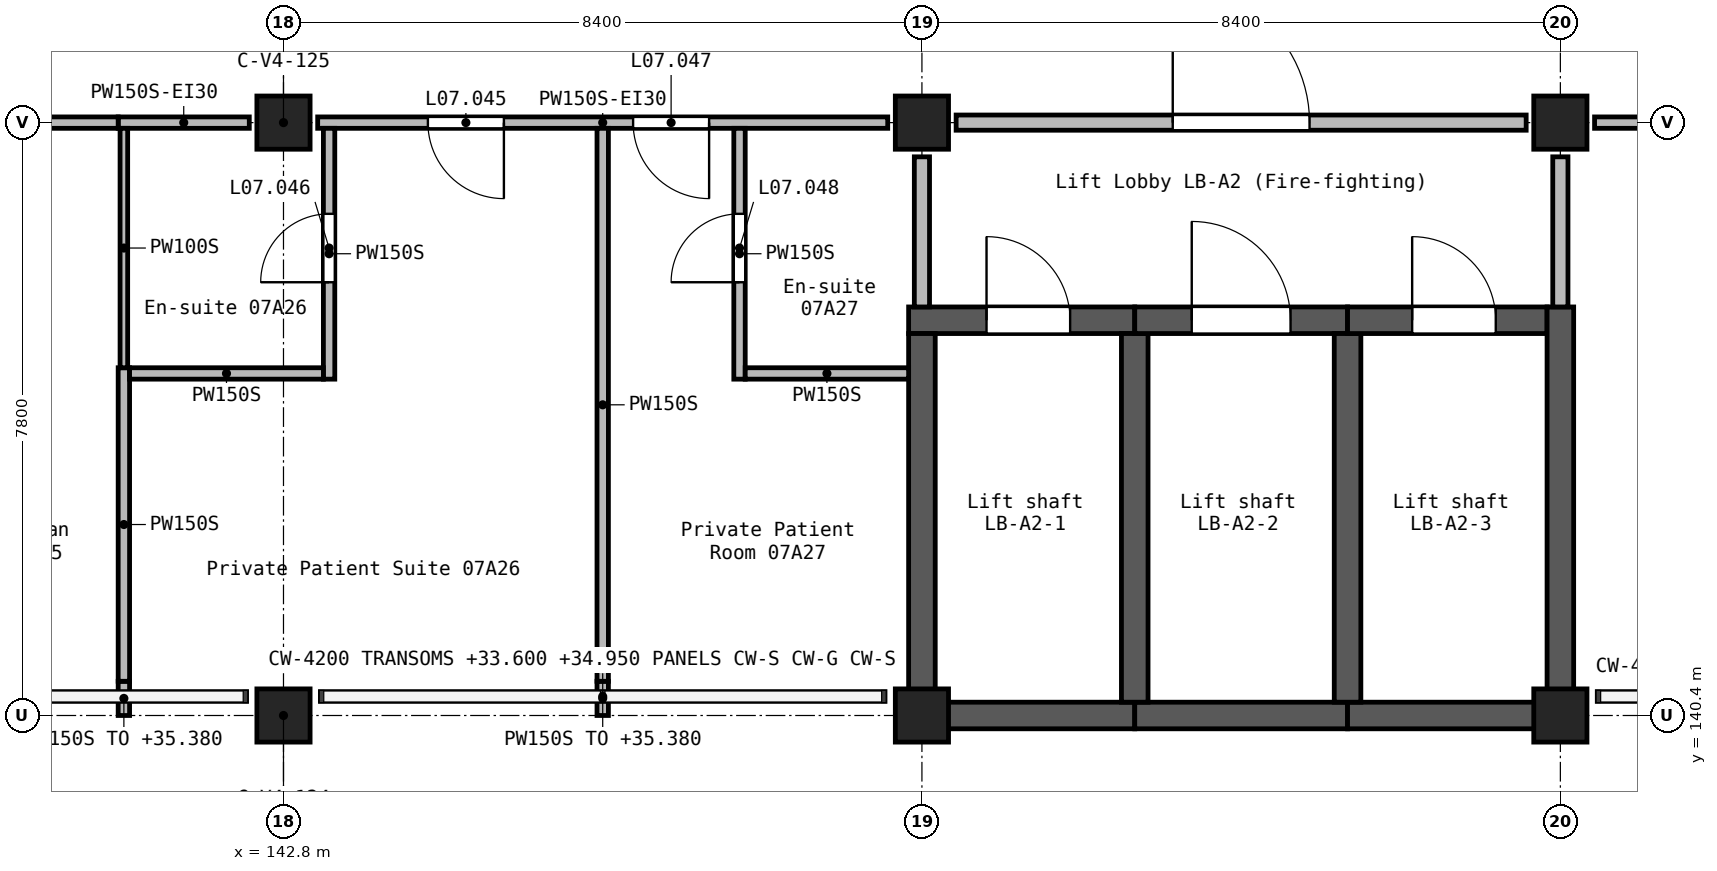
"""IFC4 building model, lengths in metres.
Left out: names, types, materials, properties, quantities, classifications, styles, units other than length and angle.
Written with IfcOpenShell. Run it as: python <this file> out.ifc"""

import sys

from ifc_helpers import new_model, si_unit, direction, frame, frame_2d, origin, origin_2d, place, context, subcontext, project, spatial, rectangle, extrude, element, fill, save


model = new_model("IFC4")
c1 = context("Model", 3, precision=1e-05, world=origin(), true_north=direction((0.0, 1.0)))
c2 = subcontext(c1, "Body", "Model", "MODEL_VIEW")
j1 = project(units=[si_unit("LENGTHUNIT", "METRE"), si_unit("PLANEANGLEUNIT", "RADIAN")], contexts=[c1])
p1 = place(None, origin())
s1 = spatial("IfcSite", under=j1, at=p1, CompositionType="ELEMENT")
p2 = place(p1, origin())
s2 = spatial("IfcBuilding", under=s1, at=p2, CompositionType="ELEMENT")
p3 = place(p2, frame((0.0, 0.0, 32.7)))
s3 = spatial("IfcBuildingStorey", under=s2, at=p3, CompositionType="ELEMENT", Elevation=32.7)
for number, where, z_axis, x_axis in (
    (1, (142.8, 140.4, 0.0), (0.0, 0.0, 1.0), (1.0, 0.0, 0.0)),
    (2, (142.8, 148.2, 0.0), (0.0, 0.0, 1.0), (1.0, 0.0, 0.0)),
    (3, (151.2, 140.4, 0.0), (0.0, 0.0, 1.0), (1.0, 0.0, 0.0)),
    (4, (151.2, 148.2, 0.0), (0.0, 0.0, 1.0), (1.0, 0.0, 0.0)),
    (5, (159.6, 140.4, 0.0), (0.0, 0.0, 1.0), (1.0, 0.0, 0.0)),
    (6, (159.6, 148.2, 0.0), (0.0, 0.0, 1.0), (1.0, 0.0, 0.0)),
):
    element("IfcColumn", number, at=place(p3, frame(where, z_axis=z_axis, x_axis=x_axis)), inside=s3, PredefinedType="COLUMN", context=c2, shape_type="SweptSolid", body=[
        extrude(rectangle(XDim=0.7, YDim=0.7, at=origin_2d()), origin(), (0.0, 0.0, 1.0), 3.9),
    ])
p4 = place(p3, frame((151.025, 145.6, 0.0), z_axis=(0.0, 0.0, 1.0), x_axis=(1.0, 0.0, 0.0)))
e7 = element("IfcWall", 7, at=p4, inside=s3, PredefinedType="SHEAR", context=c2, shape_type="SweptSolid", body=[
    extrude(rectangle(XDim=2.975, YDim=0.35, at=frame_2d((1.488, 0.0))), origin(), (0.0, 0.0, 1.0), 3.9),
])
p5 = place(p4, frame((1.025, 0.0, 0.0)))
e8 = element("IfcOpeningElement", 8, at=p5, cuts=e7, PredefinedType="OPENING", context=c2, shape_type="SweptSolid", body=[
    extrude(rectangle(XDim=1.1, YDim=2.1, at=frame_2d((0.55, 1.05))), frame((0.0, 0.185, 0.0), z_axis=(0.0, -1.0, 0.0), x_axis=(1.0, 0.0, 0.0)), (0.0, 0.0, 1.0), 0.37),
])
p6 = place(p3, frame((151.2, 140.225, 0.0), z_axis=(0.0, 0.0, 1.0), x_axis=(0.0, 1.0, 0.0)))
e9 = element("IfcWall", 9, at=p6, inside=s3, PredefinedType="SHEAR", context=c2, shape_type="SweptSolid", body=[
    extrude(rectangle(XDim=5.2, YDim=0.35, at=frame_2d((2.6, 0.0))), origin(), (0.0, 0.0, 1.0), 3.9),
])
p7 = place(p3, frame((151.375, 140.4, 0.0), z_axis=(0.0, 0.0, 1.0), x_axis=(1.0, 0.0, 0.0)))
e10 = element("IfcWall", 10, at=p7, inside=s3, PredefinedType="SHEAR", context=c2, shape_type="SweptSolid", body=[
    extrude(rectangle(XDim=2.625, YDim=0.35, at=frame_2d((1.312, 0.0))), origin(), (0.0, 0.0, 1.0), 3.9),
])
p8 = place(p3, frame((154.0, 140.4, 0.0), z_axis=(0.0, 0.0, 1.0), x_axis=(1.0, 0.0, 0.0)))
e11 = element("IfcWall", 11, at=p8, inside=s3, PredefinedType="SHEAR", context=c2, shape_type="SweptSolid", body=[
    extrude(rectangle(XDim=2.8, YDim=0.35, at=frame_2d((1.4, 0.0))), origin(), (0.0, 0.0, 1.0), 3.9),
])
p9 = place(p3, frame((154.0, 140.575, 0.0), z_axis=(0.0, 0.0, 1.0), x_axis=(0.0, 1.0, 0.0)))
e12 = element("IfcWall", 12, at=p9, inside=s3, PredefinedType="SHEAR", context=c2, shape_type="SweptSolid", body=[
    extrude(rectangle(XDim=4.85, YDim=0.35, at=frame_2d((2.425, 0.0))), origin(), (0.0, 0.0, 1.0), 3.9),
])
p10 = place(p3, frame((154.0, 145.6, 0.0), z_axis=(0.0, 0.0, 1.0), x_axis=(1.0, 0.0, 0.0)))
e13 = element("IfcWall", 13, at=p10, inside=s3, PredefinedType="SHEAR", context=c2, shape_type="SweptSolid", body=[
    extrude(rectangle(XDim=2.8, YDim=0.35, at=frame_2d((1.4, 0.0))), origin(), (0.0, 0.0, 1.0), 3.9),
])
p11 = place(p10, frame((0.75, 0.0, 0.0)))
e14 = element("IfcOpeningElement", 14, at=p11, cuts=e13, PredefinedType="OPENING", context=c2, shape_type="SweptSolid", body=[
    extrude(rectangle(XDim=1.3, YDim=2.1, at=frame_2d((0.65, 1.05))), frame((0.0, 0.185, 0.0), z_axis=(0.0, -1.0, 0.0), x_axis=(1.0, 0.0, 0.0)), (0.0, 0.0, 1.0), 0.37),
])
p12 = place(p3, frame((156.8, 140.4, 0.0), z_axis=(0.0, 0.0, 1.0), x_axis=(1.0, 0.0, 0.0)))
e15 = element("IfcWall", 15, at=p12, inside=s3, PredefinedType="SHEAR", context=c2, shape_type="SweptSolid", body=[
    extrude(rectangle(XDim=2.625, YDim=0.35, at=frame_2d((1.312, 0.0))), origin(), (0.0, 0.0, 1.0), 3.9),
])
p13 = place(p3, frame((156.8, 140.575, 0.0), z_axis=(0.0, 0.0, 1.0), x_axis=(0.0, 1.0, 0.0)))
e16 = element("IfcWall", 16, at=p13, inside=s3, PredefinedType="SHEAR", context=c2, shape_type="SweptSolid", body=[
    extrude(rectangle(XDim=4.85, YDim=0.35, at=frame_2d((2.425, 0.0))), origin(), (0.0, 0.0, 1.0), 3.9),
])
p14 = place(p3, frame((156.8, 145.6, 0.0), z_axis=(0.0, 0.0, 1.0), x_axis=(1.0, 0.0, 0.0)))
e17 = element("IfcWall", 17, at=p14, inside=s3, PredefinedType="SHEAR", context=c2, shape_type="SweptSolid", body=[
    extrude(rectangle(XDim=2.625, YDim=0.35, at=frame_2d((1.312, 0.0))), origin(), (0.0, 0.0, 1.0), 3.9),
])
p15 = place(p14, frame((0.85, 0.0, 0.0)))
e18 = element("IfcOpeningElement", 18, at=p15, cuts=e17, PredefinedType="OPENING", context=c2, shape_type="SweptSolid", body=[
    extrude(rectangle(XDim=1.1, YDim=2.1, at=frame_2d((0.55, 1.05))), frame((0.0, 0.185, 0.0), z_axis=(0.0, -1.0, 0.0), x_axis=(1.0, 0.0, 0.0)), (0.0, 0.0, 1.0), 0.37),
])
p16 = place(p3, frame((159.6, 140.225, 0.0), z_axis=(0.0, 0.0, 1.0), x_axis=(0.0, 1.0, 0.0)))
e19 = element("IfcWall", 19, at=p16, inside=s3, PredefinedType="SHEAR", context=c2, shape_type="SweptSolid", body=[
    extrude(rectangle(XDim=5.55, YDim=0.35, at=frame_2d((2.775, 0.0))), origin(), (0.0, 0.0, 1.0), 3.9),
])
p17 = place(p3, frame((151.65, 148.2, 0.0), z_axis=(0.0, 0.0, 1.0), x_axis=(1.0, 0.0, 0.0)))
e20 = element("IfcWall", 20, at=p17, inside=s3, PredefinedType="SOLIDWALL", context=c2, shape_type="SweptSolid", body=[
    extrude(rectangle(XDim=7.5, YDim=0.2, at=frame_2d((3.75, 0.0))), origin(), (0.0, 0.0, 1.0), 3.6),
])
p18 = place(p17, frame((2.85, 0.0, 0.0)))
e21 = element("IfcOpeningElement", 21, at=p18, cuts=e20, PredefinedType="OPENING", context=c2, shape_type="SweptSolid", body=[
    extrude(rectangle(XDim=1.8, YDim=2.1, at=frame_2d((0.9, 1.05))), frame((0.0, 0.11, 0.0), z_axis=(0.0, -1.0, 0.0), x_axis=(1.0, 0.0, 0.0)), (0.0, 0.0, 1.0), 0.22),
])
for number, where, z_axis, x_axis in (
    (22, (151.2, 145.775, 0.0), (0.0, 0.0, 1.0), (0.0, 1.0, 0.0)),
    (23, (159.6, 145.775, 0.0), (0.0, 0.0, 1.0), (0.0, 1.0, 0.0)),
):
    element("IfcWall", number, at=place(p3, frame(where, z_axis=z_axis, x_axis=x_axis)), inside=s3, PredefinedType="SOLIDWALL", context=c2, shape_type="SweptSolid", body=[
        extrude(rectangle(XDim=1.975, YDim=0.2, at=frame_2d((0.988, 0.0))), origin(), (0.0, 0.0, 1.0), 3.6),
    ])
p19 = place(p3, frame((160.05, 148.2, 0.0), z_axis=(0.0, 0.0, 1.0), x_axis=(1.0, 0.0, 0.0)))
e24 = element("IfcWall", 24, at=p19, inside=s3, PredefinedType="PARTITIONING", context=c2, shape_type="SweptSolid", body=[
    extrude(rectangle(XDim=7.5, YDim=0.15, at=frame_2d((3.75, 0.0))), origin(), (0.0, 0.0, 1.0), 3.6),
])
p20 = place(p3, frame((150.75, 148.2, 0.0), z_axis=(0.0, 0.0, 1.0), x_axis=(-1.0, 0.0, 0.0)))
e25 = element("IfcWall", 25, at=p20, inside=s3, PredefinedType="PARTITIONING", context=c2, shape_type="SweptSolid", body=[
    extrude(rectangle(XDim=7.5, YDim=0.15, at=frame_2d((3.75, 0.0))), origin(), (0.0, 0.0, 1.0), 3.6),
])
p21 = place(p20, frame((5.05, 0.0, 0.0)))
e26 = element("IfcOpeningElement", 26, at=p21, cuts=e25, PredefinedType="OPENING", context=c2, shape_type="SweptSolid", body=[
    extrude(rectangle(XDim=1.0, YDim=2.1, at=frame_2d((0.5, 1.05))), frame((0.0, 0.085, 0.0), z_axis=(0.0, -1.0, 0.0), x_axis=(1.0, 0.0, 0.0)), (0.0, 0.0, 1.0), 0.17),
])
p22 = place(p20, frame((2.35, 0.0, 0.0)))
e27 = element("IfcOpeningElement", 27, at=p22, cuts=e25, PredefinedType="OPENING", context=c2, shape_type="SweptSolid", body=[
    extrude(rectangle(XDim=1.0, YDim=2.1, at=frame_2d((0.5, 1.05))), frame((0.0, 0.085, 0.0), z_axis=(0.0, -1.0, 0.0), x_axis=(1.0, 0.0, 0.0)), (0.0, 0.0, 1.0), 0.17),
])
p23 = place(p3, frame((142.35, 148.2, 0.0), z_axis=(0.0, 0.0, 1.0), x_axis=(-1.0, 0.0, 0.0)))
e28 = element("IfcWall", 28, at=p23, inside=s3, PredefinedType="PARTITIONING", context=c2, shape_type="SweptSolid", body=[
    extrude(rectangle(XDim=1.725, YDim=0.15, at=frame_2d((0.863, 0.0))), origin(), (0.0, 0.0, 1.0), 3.6),
])
p24 = place(p3, frame((136.575, 148.2, 0.0), z_axis=(0.0, 0.0, 1.0), x_axis=(1.0, 0.0, 0.0)))
e29 = element("IfcWall", 29, at=p24, inside=s3, PredefinedType="PARTITIONING", context=c2, shape_type="SweptSolid", body=[
    extrude(rectangle(XDim=4.05, YDim=0.15, at=frame_2d((2.025, 0.0))), origin(), (0.0, 0.0, 1.0), 3.6),
])
p25 = place(p24, frame((1.525, 0.0, 0.0)))
e30 = element("IfcOpeningElement", 30, at=p25, cuts=e29, PredefinedType="OPENING", context=c2, shape_type="SweptSolid", body=[
    extrude(rectangle(XDim=1.0, YDim=2.1, at=frame_2d((0.5, 1.05))), frame((0.0, 0.085, 0.0), z_axis=(0.0, -1.0, 0.0), x_axis=(1.0, 0.0, 0.0)), (0.0, 0.0, 1.0), 0.17),
])
p26 = place(p3, frame((147.0, 140.4, 0.0), z_axis=(0.0, 0.0, 1.0), x_axis=(0.0, 1.0, 0.0)))
e31 = element("IfcWall", 31, at=p26, inside=s3, PredefinedType="PARTITIONING", context=c2, shape_type="SweptSolid", body=[
    extrude(rectangle(XDim=0.45, YDim=0.15, at=frame_2d((0.225, 0.0))), origin(), (0.0, 0.0, 1.0), 2.68),
])
p27 = place(p3, frame((147.0, 140.85, 0.0), z_axis=(0.0, 0.0, 1.0), x_axis=(0.0, 1.0, 0.0)))
e32 = element("IfcWall", 32, at=p27, inside=s3, PredefinedType="PARTITIONING", context=c2, shape_type="SweptSolid", body=[
    extrude(rectangle(XDim=7.275, YDim=0.15, at=frame_2d((3.637, 0.0))), origin(), (0.0, 0.0, 1.0), 3.6),
])
p28 = place(p3, frame((140.7, 140.4, 0.0), z_axis=(0.0, 0.0, 1.0), x_axis=(0.0, 1.0, 0.0)))
e33 = element("IfcWall", 33, at=p28, inside=s3, PredefinedType="PARTITIONING", context=c2, shape_type="SweptSolid", body=[
    extrude(rectangle(XDim=0.45, YDim=0.15, at=frame_2d((0.225, 0.0))), origin(), (0.0, 0.0, 1.0), 2.68),
])
p29 = place(p3, frame((140.7, 140.85, 0.0), z_axis=(0.0, 0.0, 1.0), x_axis=(0.0, 1.0, 0.0)))
e34 = element("IfcWall", 34, at=p29, inside=s3, PredefinedType="PARTITIONING", context=c2, shape_type="SweptSolid", body=[
    extrude(rectangle(XDim=4.125, YDim=0.15, at=frame_2d((2.062, 0.0))), origin(), (0.0, 0.0, 1.0), 3.6),
])
p30 = place(p3, frame((143.4, 144.825, 0.0), z_axis=(0.0, 0.0, 1.0), x_axis=(0.0, 1.0, 0.0)))
e35 = element("IfcWall", 35, at=p30, inside=s3, PredefinedType="PARTITIONING", context=c2, shape_type="SweptSolid", body=[
    extrude(rectangle(XDim=3.3, YDim=0.15, at=frame_2d((1.65, 0.0))), origin(), (0.0, 0.0, 1.0), 3.6),
])
p31 = place(p30, frame((1.275, 0.0, 0.0)))
e36 = element("IfcOpeningElement", 36, at=p31, cuts=e35, PredefinedType="OPENING", context=c2, shape_type="SweptSolid", body=[
    extrude(rectangle(XDim=0.9, YDim=2.1, at=frame_2d((0.45, 1.05))), frame((0.0, 0.085, 0.0), z_axis=(0.0, -1.0, 0.0), x_axis=(1.0, 0.0, 0.0)), (0.0, 0.0, 1.0), 0.17),
])
p32 = place(p3, frame((148.8, 144.825, 0.0), z_axis=(0.0, 0.0, 1.0), x_axis=(0.0, 1.0, 0.0)))
e37 = element("IfcWall", 37, at=p32, inside=s3, PredefinedType="PARTITIONING", context=c2, shape_type="SweptSolid", body=[
    extrude(rectangle(XDim=3.3, YDim=0.15, at=frame_2d((1.65, 0.0))), origin(), (0.0, 0.0, 1.0), 3.6),
])
p33 = place(p32, frame((1.275, 0.0, 0.0)))
e38 = element("IfcOpeningElement", 38, at=p33, cuts=e37, PredefinedType="OPENING", context=c2, shape_type="SweptSolid", body=[
    extrude(rectangle(XDim=0.9, YDim=2.1, at=frame_2d((0.45, 1.05))), frame((0.0, 0.085, 0.0), z_axis=(0.0, -1.0, 0.0), x_axis=(1.0, 0.0, 0.0)), (0.0, 0.0, 1.0), 0.17),
])
p34 = place(p3, frame((140.775, 144.9, 0.0), z_axis=(0.0, 0.0, 1.0), x_axis=(1.0, 0.0, 0.0)))
e39 = element("IfcWall", 39, at=p34, inside=s3, PredefinedType="PARTITIONING", context=c2, shape_type="SweptSolid", body=[
    extrude(rectangle(XDim=2.55, YDim=0.15, at=frame_2d((1.275, 0.0))), origin(), (0.0, 0.0, 1.0), 3.6),
])
p35 = place(p3, frame((148.875, 144.9, 0.0), z_axis=(0.0, 0.0, 1.0), x_axis=(1.0, 0.0, 0.0)))
e40 = element("IfcWall", 40, at=p35, inside=s3, PredefinedType="PARTITIONING", context=c2, shape_type="SweptSolid", body=[
    extrude(rectangle(XDim=2.15, YDim=0.15, at=frame_2d((1.075, 0.0))), origin(), (0.0, 0.0, 1.0), 3.6),
])
p36 = place(p3, frame((140.7, 144.975, 0.0), z_axis=(0.0, 0.0, 1.0), x_axis=(0.0, 1.0, 0.0)))
e41 = element("IfcWall", 41, at=p36, inside=s3, PredefinedType="PARTITIONING", context=c2, shape_type="SweptSolid", body=[
    extrude(rectangle(XDim=3.15, YDim=0.1, at=frame_2d((1.575, 0.0))), origin(), (0.0, 0.0, 1.0), 3.6),
])
p37 = place(p21, origin())
e42 = element("IfcDoor", 42, at=p37, inside=s3, OperationType="SINGLE_SWING_RIGHT", PredefinedType="DOOR", context=c2, shape_type="SweptSolid", body=[
    extrude(rectangle(XDim=1.0, YDim=2.1, at=frame_2d((0.5, 1.05))), frame((0.0, 0.025, 0.0), z_axis=(0.0, -1.0, 0.0), x_axis=(1.0, 0.0, 0.0)), (0.0, 0.0, 1.0), 0.05),
])
fill(e26, e42)
p38 = place(p31, origin())
e43 = element("IfcDoor", 43, at=p38, inside=s3, OperationType="SINGLE_SWING_RIGHT", PredefinedType="DOOR", context=c2, shape_type="SweptSolid", body=[
    extrude(rectangle(XDim=0.9, YDim=2.1, at=frame_2d((0.45, 1.05))), frame((0.0, 0.025, 0.0), z_axis=(0.0, -1.0, 0.0), x_axis=(1.0, 0.0, 0.0)), (0.0, 0.0, 1.0), 0.05),
])
fill(e36, e43)
p39 = place(p22, origin())
e44 = element("IfcDoor", 44, at=p39, inside=s3, OperationType="SINGLE_SWING_LEFT", PredefinedType="DOOR", context=c2, shape_type="SweptSolid", body=[
    extrude(rectangle(XDim=1.0, YDim=2.1, at=frame_2d((0.5, 1.05))), frame((0.0, 0.025, 0.0), z_axis=(0.0, -1.0, 0.0), x_axis=(1.0, 0.0, 0.0)), (0.0, 0.0, 1.0), 0.05),
])
fill(e27, e44)
p40 = place(p33, frame((0.9, 0.0, 0.0), z_axis=(0.0, 0.0, 1.0), x_axis=(-1.0, 0.0, 0.0)))
e45 = element("IfcDoor", 45, at=p40, inside=s3, OperationType="SINGLE_SWING_LEFT", PredefinedType="DOOR", context=c2, shape_type="SweptSolid", body=[
    extrude(rectangle(XDim=0.9, YDim=2.1, at=frame_2d((0.45, 1.05))), frame((0.0, 0.025, 0.0), z_axis=(0.0, -1.0, 0.0), x_axis=(1.0, 0.0, 0.0)), (0.0, 0.0, 1.0), 0.05),
])
fill(e38, e45)
p41 = place(p18, frame((1.8, 0.0, 0.0), z_axis=(0.0, 0.0, 1.0), x_axis=(-1.0, 0.0, 0.0)))
e46 = element("IfcDoor", 46, at=p41, inside=s3, OperationType="DOUBLE_DOOR_SINGLE_SWING", PredefinedType="DOOR", context=c2, shape_type="SweptSolid", body=[
    extrude(rectangle(XDim=1.8, YDim=2.1, at=frame_2d((0.9, 1.05))), frame((0.0, 0.025, 0.0), z_axis=(0.0, -1.0, 0.0), x_axis=(1.0, 0.0, 0.0)), (0.0, 0.0, 1.0), 0.05),
])
fill(e21, e46)
p42 = place(p5, origin())
e47 = element("IfcDoor", 47, at=p42, inside=s3, OperationType="DOUBLE_DOOR_SLIDING", PredefinedType="DOOR", context=c2, shape_type="SweptSolid", body=[
    extrude(rectangle(XDim=1.1, YDim=2.1, at=frame_2d((0.55, 1.05))), frame((0.0, 0.025, 0.0), z_axis=(0.0, -1.0, 0.0), x_axis=(1.0, 0.0, 0.0)), (0.0, 0.0, 1.0), 0.05),
])
fill(e8, e47)
p43 = place(p11, origin())
e48 = element("IfcDoor", 48, at=p43, inside=s3, OperationType="DOUBLE_DOOR_SLIDING", PredefinedType="DOOR", context=c2, shape_type="SweptSolid", body=[
    extrude(rectangle(XDim=1.3, YDim=2.1, at=frame_2d((0.65, 1.05))), frame((0.0, 0.025, 0.0), z_axis=(0.0, -1.0, 0.0), x_axis=(1.0, 0.0, 0.0)), (0.0, 0.0, 1.0), 0.05),
])
fill(e14, e48)
p44 = place(p15, origin())
e49 = element("IfcDoor", 49, at=p44, inside=s3, OperationType="DOUBLE_DOOR_SLIDING", PredefinedType="DOOR", context=c2, shape_type="SweptSolid", body=[
    extrude(rectangle(XDim=1.1, YDim=2.1, at=frame_2d((0.55, 1.05))), frame((0.0, 0.025, 0.0), z_axis=(0.0, -1.0, 0.0), x_axis=(1.0, 0.0, 0.0)), (0.0, 0.0, 1.0), 0.05),
])
fill(e18, e49)
save(model, sys.argv[1])
